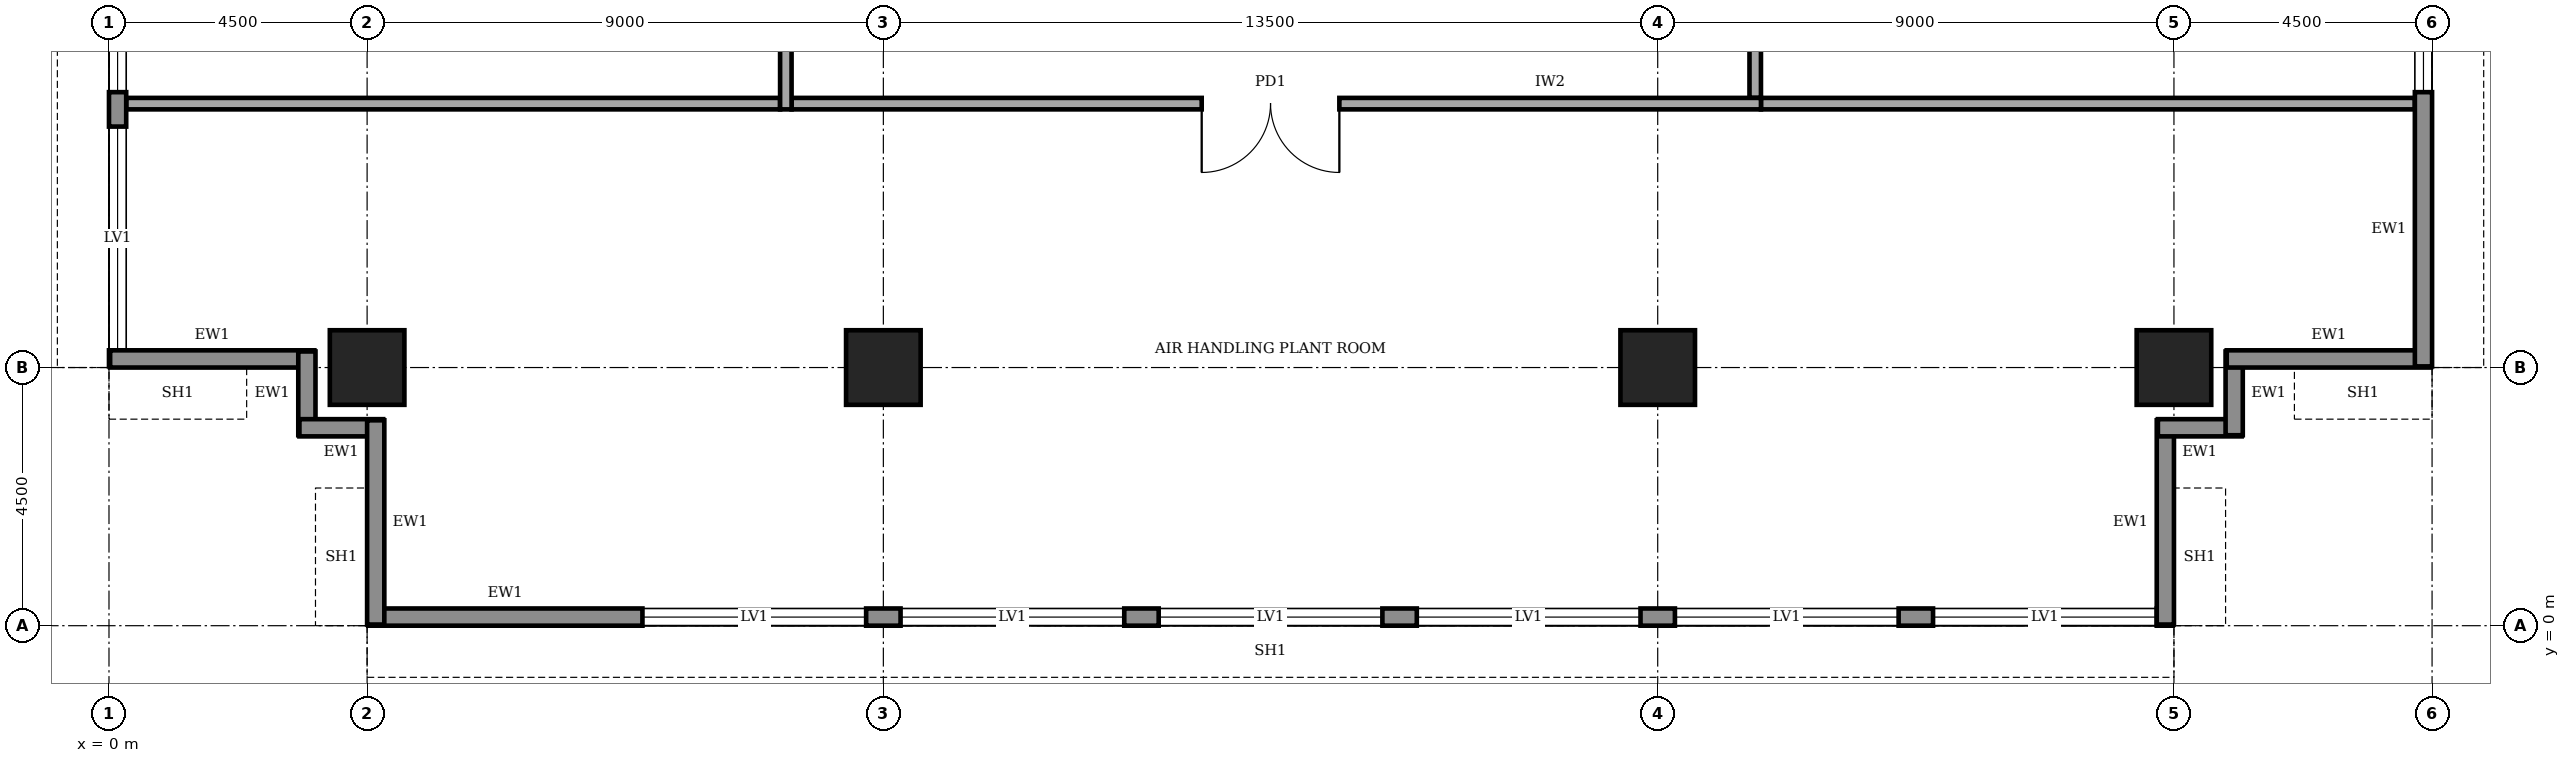
"""IFC4 building model, lengths in metres.
Left out: names, types, materials, properties, quantities, classifications, styles, units other than length and angle.
Written with IfcOpenShell. Run it as: python <this file> out.ifc"""

import sys

from ifc_helpers import new_model, si_unit, direction, frame, frame_2d, origin, origin_2d, place, context, subcontext, project, spatial, rectangle, extrude, element, fill, save


model = new_model("IFC4")
c1 = context("Model", 3, precision=1e-05, world=origin(), true_north=direction((0.0, 1.0)))
c2 = subcontext(c1, "Body", "Model", "MODEL_VIEW")
j1 = project(units=[si_unit("LENGTHUNIT", "METRE"), si_unit("PLANEANGLEUNIT", "RADIAN")], contexts=[c1])
p1 = place(None, origin())
s1 = spatial("IfcSite", under=j1, at=p1, CompositionType="ELEMENT")
p2 = place(p1, origin())
s2 = spatial("IfcBuilding", under=s1, at=p2, CompositionType="ELEMENT")
p3 = place(p2, frame((0.0, 0.0, 289.0)))
s3 = spatial("IfcBuildingStorey", under=s2, at=p3, CompositionType="ELEMENT", Elevation=289.0)
for number, where, z_axis, x_axis in (
    (1, (4.5, 4.5, 0.0), (0.0, 0.0, 1.0), (1.0, 0.0, 0.0)),
    (2, (13.5, 4.5, 0.0), (0.0, 0.0, 1.0), (1.0, 0.0, 0.0)),
    (3, (27.0, 4.5, 0.0), (0.0, 0.0, 1.0), (1.0, 0.0, 0.0)),
    (4, (36.0, 4.5, 0.0), (0.0, 0.0, 1.0), (1.0, 0.0, 0.0)),
):
    element("IfcColumn", number, at=place(p3, frame(where, z_axis=z_axis, x_axis=x_axis)), inside=s3, PredefinedType="COLUMN", context=c2, shape_type="SweptSolid", body=[
        extrude(rectangle(XDim=1.3, YDim=1.3, at=origin_2d()), origin(), (0.0, 0.0, 1.0), 4.0),
    ])
p4 = place(p3, frame((4.52, 0.15, 0.0), z_axis=(0.0, 0.0, 1.0), x_axis=(1.0, 0.0, 0.0)))
e5 = element("IfcWall", 5, at=p4, inside=s3, PredefinedType="STANDARD", context=c2, shape_type="SweptSolid", body=[
    extrude(rectangle(XDim=31.46, YDim=0.3, at=frame_2d((15.73, 0.0))), origin(), (0.0, 0.0, 1.0), 3.75),
])
p5 = place(p4, frame((4.78, 0.0, 0.9)))
e6 = element("IfcOpeningElement", 6, at=p5, cuts=e5, PredefinedType="OPENING", context=c2, shape_type="SweptSolid", body=[
    extrude(rectangle(XDim=3.9, YDim=2.2, at=frame_2d((1.95, 1.1))), frame((0.0, 0.16, 0.0), z_axis=(0.0, -1.0, 0.0), x_axis=(1.0, 0.0, 0.0)), (0.0, 0.0, 1.0), 0.32),
])
p6 = place(p4, frame((9.28, 0.0, 0.9)))
e7 = element("IfcOpeningElement", 7, at=p6, cuts=e5, PredefinedType="OPENING", context=c2, shape_type="SweptSolid", body=[
    extrude(rectangle(XDim=3.9, YDim=2.2, at=frame_2d((1.95, 1.1))), frame((0.0, 0.16, 0.0), z_axis=(0.0, -1.0, 0.0), x_axis=(1.0, 0.0, 0.0)), (0.0, 0.0, 1.0), 0.32),
])
p7 = place(p4, frame((13.78, 0.0, 0.9)))
e8 = element("IfcOpeningElement", 8, at=p7, cuts=e5, PredefinedType="OPENING", context=c2, shape_type="SweptSolid", body=[
    extrude(rectangle(XDim=3.9, YDim=2.2, at=frame_2d((1.95, 1.1))), frame((0.0, 0.16, 0.0), z_axis=(0.0, -1.0, 0.0), x_axis=(1.0, 0.0, 0.0)), (0.0, 0.0, 1.0), 0.32),
])
p8 = place(p4, frame((18.28, 0.0, 0.9)))
e9 = element("IfcOpeningElement", 9, at=p8, cuts=e5, PredefinedType="OPENING", context=c2, shape_type="SweptSolid", body=[
    extrude(rectangle(XDim=3.9, YDim=2.2, at=frame_2d((1.95, 1.1))), frame((0.0, 0.16, 0.0), z_axis=(0.0, -1.0, 0.0), x_axis=(1.0, 0.0, 0.0)), (0.0, 0.0, 1.0), 0.32),
])
p9 = place(p4, frame((22.78, 0.0, 0.9)))
e10 = element("IfcOpeningElement", 10, at=p9, cuts=e5, PredefinedType="OPENING", context=c2, shape_type="SweptSolid", body=[
    extrude(rectangle(XDim=3.9, YDim=2.2, at=frame_2d((1.95, 1.1))), frame((0.0, 0.16, 0.0), z_axis=(0.0, -1.0, 0.0), x_axis=(1.0, 0.0, 0.0)), (0.0, 0.0, 1.0), 0.32),
])
p10 = place(p4, frame((27.28, 0.0, 0.9)))
e11 = element("IfcOpeningElement", 11, at=p10, cuts=e5, PredefinedType="OPENING", context=c2, shape_type="SweptSolid", body=[
    extrude(rectangle(XDim=3.9, YDim=2.2, at=frame_2d((1.95, 1.1))), frame((0.0, 0.16, 0.0), z_axis=(0.0, -1.0, 0.0), x_axis=(1.0, 0.0, 0.0)), (0.0, 0.0, 1.0), 0.32),
])
p11 = place(p3, frame((35.85, 0.02, 0.0), z_axis=(0.0, 0.0, 1.0), x_axis=(0.0, 1.0, 0.0)))
e12 = element("IfcWall", 12, at=p11, inside=s3, PredefinedType="STANDARD", context=c2, shape_type="SweptSolid", body=[
    extrude(rectangle(XDim=3.56, YDim=0.3, at=frame_2d((1.78, 0.0))), origin(), (0.0, 0.0, 1.0), 2.85),
])
for number, where, z_axis, x_axis in (
    (13, (35.72, 3.45, 0.0), (0.0, 0.0, 1.0), (1.0, 0.0, 0.0)),
    (14, (37.05, 3.32, 0.0), (0.0, 0.0, 1.0), (0.0, 1.0, 0.0)),
):
    element("IfcWall", number, at=place(p3, frame(where, z_axis=z_axis, x_axis=x_axis)), inside=s3, PredefinedType="STANDARD", context=c2, shape_type="SweptSolid", body=[
        extrude(rectangle(XDim=1.46, YDim=0.3, at=frame_2d((0.73, 0.0))), origin(), (0.0, 0.0, 1.0), 3.75),
    ])
p12 = place(p3, frame((36.92, 4.65, 0.0), z_axis=(0.0, 0.0, 1.0), x_axis=(1.0, 0.0, 0.0)))
e15 = element("IfcWall", 15, at=p12, inside=s3, PredefinedType="STANDARD", context=c2, shape_type="SweptSolid", body=[
    extrude(rectangle(XDim=3.56, YDim=0.3, at=frame_2d((1.78, 0.0))), origin(), (0.0, 0.0, 1.0), 2.85),
])
p13 = place(p3, frame((40.35, 4.52, 0.0), z_axis=(0.0, 0.0, 1.0), x_axis=(0.0, 1.0, 0.0)))
e16 = element("IfcWall", 16, at=p13, inside=s3, PredefinedType="STANDARD", context=c2, shape_type="SweptSolid", body=[
    extrude(rectangle(XDim=31.46, YDim=0.3, at=frame_2d((15.73, 0.0))), origin(), (0.0, 0.0, 1.0), 3.75),
])
p14 = place(p13, frame((4.78, 0.0, 0.9)))
e17 = element("IfcOpeningElement", 17, at=p14, cuts=e16, PredefinedType="OPENING", context=c2, shape_type="SweptSolid", body=[
    extrude(rectangle(XDim=3.9, YDim=2.2, at=frame_2d((1.95, 1.1))), frame((0.0, 0.16, 0.0), z_axis=(0.0, -1.0, 0.0), x_axis=(1.0, 0.0, 0.0)), (0.0, 0.0, 1.0), 0.32),
])
p15 = place(p13, frame((9.28, 0.0, 0.9)))
e18 = element("IfcOpeningElement", 18, at=p15, cuts=e16, PredefinedType="OPENING", context=c2, shape_type="SweptSolid", body=[
    extrude(rectangle(XDim=3.9, YDim=2.2, at=frame_2d((1.95, 1.1))), frame((0.0, 0.16, 0.0), z_axis=(0.0, -1.0, 0.0), x_axis=(1.0, 0.0, 0.0)), (0.0, 0.0, 1.0), 0.32),
])
p16 = place(p13, frame((13.78, 0.0, 0.9)))
e19 = element("IfcOpeningElement", 19, at=p16, cuts=e16, PredefinedType="OPENING", context=c2, shape_type="SweptSolid", body=[
    extrude(rectangle(XDim=3.9, YDim=2.2, at=frame_2d((1.95, 1.1))), frame((0.0, 0.16, 0.0), z_axis=(0.0, -1.0, 0.0), x_axis=(1.0, 0.0, 0.0)), (0.0, 0.0, 1.0), 0.32),
])
p17 = place(p13, frame((18.28, 0.0, 0.9)))
e20 = element("IfcOpeningElement", 20, at=p17, cuts=e16, PredefinedType="OPENING", context=c2, shape_type="SweptSolid", body=[
    extrude(rectangle(XDim=3.9, YDim=2.2, at=frame_2d((1.95, 1.1))), frame((0.0, 0.16, 0.0), z_axis=(0.0, -1.0, 0.0), x_axis=(1.0, 0.0, 0.0)), (0.0, 0.0, 1.0), 0.32),
])
p18 = place(p13, frame((22.78, 0.0, 0.9)))
e21 = element("IfcOpeningElement", 21, at=p18, cuts=e16, PredefinedType="OPENING", context=c2, shape_type="SweptSolid", body=[
    extrude(rectangle(XDim=3.9, YDim=2.2, at=frame_2d((1.95, 1.1))), frame((0.0, 0.16, 0.0), z_axis=(0.0, -1.0, 0.0), x_axis=(1.0, 0.0, 0.0)), (0.0, 0.0, 1.0), 0.32),
])
p19 = place(p13, frame((27.28, 0.0, 0.9)))
e22 = element("IfcOpeningElement", 22, at=p19, cuts=e16, PredefinedType="OPENING", context=c2, shape_type="SweptSolid", body=[
    extrude(rectangle(XDim=3.9, YDim=2.2, at=frame_2d((1.95, 1.1))), frame((0.0, 0.16, 0.0), z_axis=(0.0, -1.0, 0.0), x_axis=(1.0, 0.0, 0.0)), (0.0, 0.0, 1.0), 0.32),
])
p20 = place(p3, frame((0.15, 35.98, 0.0), z_axis=(0.0, 0.0, 1.0), x_axis=(0.0, -1.0, 0.0)))
e23 = element("IfcWall", 23, at=p20, inside=s3, PredefinedType="STANDARD", context=c2, shape_type="SweptSolid", body=[
    extrude(rectangle(XDim=31.46, YDim=0.3, at=frame_2d((15.73, 0.0))), origin(), (0.0, 0.0, 1.0), 3.75),
])
p21 = place(p20, frame((27.28, 0.0, 0.9)))
e24 = element("IfcOpeningElement", 24, at=p21, cuts=e23, PredefinedType="OPENING", context=c2, shape_type="SweptSolid", body=[
    extrude(rectangle(XDim=3.9, YDim=2.2, at=frame_2d((1.95, 1.1))), frame((0.0, 0.16, 0.0), z_axis=(0.0, -1.0, 0.0), x_axis=(1.0, 0.0, 0.0)), (0.0, 0.0, 1.0), 0.32),
])
p22 = place(p20, frame((22.78, 0.0, 0.9)))
e25 = element("IfcOpeningElement", 25, at=p22, cuts=e23, PredefinedType="OPENING", context=c2, shape_type="SweptSolid", body=[
    extrude(rectangle(XDim=3.9, YDim=2.2, at=frame_2d((1.95, 1.1))), frame((0.0, 0.16, 0.0), z_axis=(0.0, -1.0, 0.0), x_axis=(1.0, 0.0, 0.0)), (0.0, 0.0, 1.0), 0.32),
])
p23 = place(p20, frame((18.28, 0.0, 0.9)))
e26 = element("IfcOpeningElement", 26, at=p23, cuts=e23, PredefinedType="OPENING", context=c2, shape_type="SweptSolid", body=[
    extrude(rectangle(XDim=3.9, YDim=2.2, at=frame_2d((1.95, 1.1))), frame((0.0, 0.16, 0.0), z_axis=(0.0, -1.0, 0.0), x_axis=(1.0, 0.0, 0.0)), (0.0, 0.0, 1.0), 0.32),
])
p24 = place(p20, frame((13.78, 0.0, 0.9)))
e27 = element("IfcOpeningElement", 27, at=p24, cuts=e23, PredefinedType="OPENING", context=c2, shape_type="SweptSolid", body=[
    extrude(rectangle(XDim=3.9, YDim=2.2, at=frame_2d((1.95, 1.1))), frame((0.0, 0.16, 0.0), z_axis=(0.0, -1.0, 0.0), x_axis=(1.0, 0.0, 0.0)), (0.0, 0.0, 1.0), 0.32),
])
p25 = place(p20, frame((9.28, 0.0, 0.9)))
e28 = element("IfcOpeningElement", 28, at=p25, cuts=e23, PredefinedType="OPENING", context=c2, shape_type="SweptSolid", body=[
    extrude(rectangle(XDim=3.9, YDim=2.2, at=frame_2d((1.95, 1.1))), frame((0.0, 0.16, 0.0), z_axis=(0.0, -1.0, 0.0), x_axis=(1.0, 0.0, 0.0)), (0.0, 0.0, 1.0), 0.32),
])
p26 = place(p20, frame((4.78, 0.0, 0.9)))
e29 = element("IfcOpeningElement", 29, at=p26, cuts=e23, PredefinedType="OPENING", context=c2, shape_type="SweptSolid", body=[
    extrude(rectangle(XDim=3.9, YDim=2.2, at=frame_2d((1.95, 1.1))), frame((0.0, 0.16, 0.0), z_axis=(0.0, -1.0, 0.0), x_axis=(1.0, 0.0, 0.0)), (0.0, 0.0, 1.0), 0.32),
])
p27 = place(p3, frame((0.02, 4.65, 0.0), z_axis=(0.0, 0.0, 1.0), x_axis=(1.0, 0.0, 0.0)))
e30 = element("IfcWall", 30, at=p27, inside=s3, PredefinedType="STANDARD", context=c2, shape_type="SweptSolid", body=[
    extrude(rectangle(XDim=3.56, YDim=0.3, at=frame_2d((1.78, 0.0))), origin(), (0.0, 0.0, 1.0), 2.85),
])
for number, where, z_axis, x_axis in (
    (31, (3.45, 4.78, 0.0), (0.0, 0.0, 1.0), (0.0, -1.0, 0.0)),
    (32, (3.32, 3.45, 0.0), (0.0, 0.0, 1.0), (1.0, 0.0, 0.0)),
):
    element("IfcWall", number, at=place(p3, frame(where, z_axis=z_axis, x_axis=x_axis)), inside=s3, PredefinedType="STANDARD", context=c2, shape_type="SweptSolid", body=[
        extrude(rectangle(XDim=1.46, YDim=0.3, at=frame_2d((0.73, 0.0))), origin(), (0.0, 0.0, 1.0), 3.75),
    ])
p28 = place(p3, frame((4.65, 3.58, 0.0), z_axis=(0.0, 0.0, 1.0), x_axis=(0.0, -1.0, 0.0)))
e33 = element("IfcWall", 33, at=p28, inside=s3, PredefinedType="STANDARD", context=c2, shape_type="SweptSolid", body=[
    extrude(rectangle(XDim=3.56, YDim=0.3, at=frame_2d((1.78, 0.0))), origin(), (0.0, 0.0, 1.0), 2.85),
])
p29 = place(p3, frame((11.9, 9.1, 0.0), z_axis=(0.0, 0.0, 1.0), x_axis=(1.0, 0.0, 0.0)))
e34 = element("IfcWall", 34, at=p29, inside=s3, PredefinedType="SOLIDWALL", context=c2, shape_type="SweptSolid", body=[
    extrude(rectangle(XDim=16.9, YDim=0.2, at=frame_2d((8.45, 0.0))), origin(), (0.0, 0.0, 1.0), 3.75),
])
p30 = place(p29, frame((7.15, 0.0, 0.0)))
e35 = element("IfcOpeningElement", 35, at=p30, cuts=e34, PredefinedType="OPENING", context=c2, shape_type="SweptSolid", body=[
    extrude(rectangle(XDim=2.4, YDim=2.7, at=frame_2d((1.2, 1.35))), frame((0.0, 0.11, 0.0), z_axis=(0.0, -1.0, 0.0), x_axis=(1.0, 0.0, 0.0)), (0.0, 0.0, 1.0), 0.22),
])
p31 = place(p3, frame((28.7, 9.2, 0.0), z_axis=(0.0, 0.0, 1.0), x_axis=(0.0, 1.0, 0.0)))
e36 = element("IfcWall", 36, at=p31, inside=s3, PredefinedType="SOLIDWALL", context=c2, shape_type="SweptSolid", body=[
    extrude(rectangle(XDim=22.3, YDim=0.2, at=frame_2d((11.15, 0.0))), origin(), (0.0, 0.0, 1.0), 3.75),
])
p32 = place(p31, frame((10.05, 0.0, 0.0)))
e37 = element("IfcOpeningElement", 37, at=p32, cuts=e36, PredefinedType="OPENING", context=c2, shape_type="SweptSolid", body=[
    extrude(rectangle(XDim=2.0, YDim=2.1, at=frame_2d((1.0, 1.05))), frame((0.0, 0.11, 0.0), z_axis=(0.0, -1.0, 0.0), x_axis=(1.0, 0.0, 0.0)), (0.0, 0.0, 1.0), 0.22),
])
p33 = place(p3, frame((11.8, 31.3, 0.0), z_axis=(0.0, 0.0, 1.0), x_axis=(0.0, -1.0, 0.0)))
e38 = element("IfcWall", 38, at=p33, inside=s3, PredefinedType="SOLIDWALL", context=c2, shape_type="SweptSolid", body=[
    extrude(rectangle(XDim=22.3, YDim=0.2, at=frame_2d((11.15, 0.0))), origin(), (0.0, 0.0, 1.0), 3.75),
])
p34 = place(p33, frame((19.55, 0.0, 0.0)))
e39 = element("IfcOpeningElement", 39, at=p34, cuts=e38, PredefinedType="OPENING", context=c2, shape_type="SweptSolid", body=[
    extrude(rectangle(XDim=1.0, YDim=2.1, at=frame_2d((0.5, 1.05))), frame((0.0, 0.11, 0.0), z_axis=(0.0, -1.0, 0.0), x_axis=(1.0, 0.0, 0.0)), (0.0, 0.0, 1.0), 0.22),
])
p35 = place(p33, frame((15.45, 0.0, 0.0)))
e40 = element("IfcOpeningElement", 40, at=p35, cuts=e38, PredefinedType="OPENING", context=c2, shape_type="SweptSolid", body=[
    extrude(rectangle(XDim=0.9, YDim=2.1, at=frame_2d((0.45, 1.05))), frame((0.0, 0.11, 0.0), z_axis=(0.0, -1.0, 0.0), x_axis=(1.0, 0.0, 0.0)), (0.0, 0.0, 1.0), 0.22),
])
p36 = place(p33, frame((12.45, 0.0, 0.0)))
e41 = element("IfcOpeningElement", 41, at=p36, cuts=e38, PredefinedType="OPENING", context=c2, shape_type="SweptSolid", body=[
    extrude(rectangle(XDim=0.9, YDim=2.1, at=frame_2d((0.45, 1.05))), frame((0.0, 0.11, 0.0), z_axis=(0.0, -1.0, 0.0), x_axis=(1.0, 0.0, 0.0)), (0.0, 0.0, 1.0), 0.22),
])
p37 = place(p33, frame((7.6, 0.0, 0.0)))
e42 = element("IfcOpeningElement", 42, at=p37, cuts=e38, PredefinedType="OPENING", context=c2, shape_type="SweptSolid", body=[
    extrude(rectangle(XDim=0.9, YDim=2.1, at=frame_2d((0.45, 1.05))), frame((0.0, 0.11, 0.0), z_axis=(0.0, -1.0, 0.0), x_axis=(1.0, 0.0, 0.0)), (0.0, 0.0, 1.0), 0.22),
])
p38 = place(p33, frame((4.8, 0.0, 0.0)))
e43 = element("IfcOpeningElement", 43, at=p38, cuts=e38, PredefinedType="OPENING", context=c2, shape_type="SweptSolid", body=[
    extrude(rectangle(XDim=1.0, YDim=2.1, at=frame_2d((0.5, 1.05))), frame((0.0, 0.11, 0.0), z_axis=(0.0, -1.0, 0.0), x_axis=(1.0, 0.0, 0.0)), (0.0, 0.0, 1.0), 0.22),
])
p39 = place(p33, frame((10.3, 0.0, 0.0)))
e44 = element("IfcOpeningElement", 44, at=p39, cuts=e38, PredefinedType="OPENING", context=c2, shape_type="SweptSolid", body=[
    extrude(rectangle(XDim=1.0, YDim=2.1, at=frame_2d((0.5, 1.05))), frame((0.0, 0.11, 0.0), z_axis=(0.0, -1.0, 0.0), x_axis=(1.0, 0.0, 0.0)), (0.0, 0.0, 1.0), 0.22),
])
p40 = place(p33, frame((1.55, 0.0, 0.0)))
e45 = element("IfcOpeningElement", 45, at=p40, cuts=e38, PredefinedType="OPENING", context=c2, shape_type="SweptSolid", body=[
    extrude(rectangle(XDim=1.0, YDim=2.1, at=frame_2d((0.5, 1.05))), frame((0.0, 0.11, 0.0), z_axis=(0.0, -1.0, 0.0), x_axis=(1.0, 0.0, 0.0)), (0.0, 0.0, 1.0), 0.22),
])
for number, where, z_axis, x_axis in (
    (46, (0.3, 9.1, 0.0), (0.0, 0.0, 1.0), (1.0, 0.0, 0.0)),
    (47, (28.8, 9.1, 0.0), (0.0, 0.0, 1.0), (1.0, 0.0, 0.0)),
):
    element("IfcWall", number, at=place(p3, frame(where, z_axis=z_axis, x_axis=x_axis)), inside=s3, PredefinedType="SOLIDWALL", context=c2, shape_type="SweptSolid", body=[
        extrude(rectangle(XDim=11.4, YDim=0.2, at=frame_2d((5.7, 0.0))), origin(), (0.0, 0.0, 1.0), 3.75),
    ])
p41 = place(p5, origin())
e48 = element("IfcWindow", 48, at=p41, inside=s3, PartitioningType="SINGLE_PANEL", PredefinedType="WINDOW", context=c2, shape_type="SweptSolid", body=[
    extrude(rectangle(XDim=3.9, YDim=2.2, at=frame_2d((1.95, 1.1))), frame((0.0, 0.03, 0.0), z_axis=(0.0, -1.0, 0.0), x_axis=(1.0, 0.0, 0.0)), (0.0, 0.0, 1.0), 0.06),
])
fill(e6, e48)
p42 = place(p6, origin())
e49 = element("IfcWindow", 49, at=p42, inside=s3, PartitioningType="SINGLE_PANEL", PredefinedType="WINDOW", context=c2, shape_type="SweptSolid", body=[
    extrude(rectangle(XDim=3.9, YDim=2.2, at=frame_2d((1.95, 1.1))), frame((0.0, 0.03, 0.0), z_axis=(0.0, -1.0, 0.0), x_axis=(1.0, 0.0, 0.0)), (0.0, 0.0, 1.0), 0.06),
])
fill(e7, e49)
p43 = place(p7, origin())
e50 = element("IfcWindow", 50, at=p43, inside=s3, PartitioningType="SINGLE_PANEL", PredefinedType="WINDOW", context=c2, shape_type="SweptSolid", body=[
    extrude(rectangle(XDim=3.9, YDim=2.2, at=frame_2d((1.95, 1.1))), frame((0.0, 0.03, 0.0), z_axis=(0.0, -1.0, 0.0), x_axis=(1.0, 0.0, 0.0)), (0.0, 0.0, 1.0), 0.06),
])
fill(e8, e50)
p44 = place(p8, origin())
e51 = element("IfcWindow", 51, at=p44, inside=s3, PartitioningType="SINGLE_PANEL", PredefinedType="WINDOW", context=c2, shape_type="SweptSolid", body=[
    extrude(rectangle(XDim=3.9, YDim=2.2, at=frame_2d((1.95, 1.1))), frame((0.0, 0.03, 0.0), z_axis=(0.0, -1.0, 0.0), x_axis=(1.0, 0.0, 0.0)), (0.0, 0.0, 1.0), 0.06),
])
fill(e9, e51)
p45 = place(p9, origin())
e52 = element("IfcWindow", 52, at=p45, inside=s3, PartitioningType="SINGLE_PANEL", PredefinedType="WINDOW", context=c2, shape_type="SweptSolid", body=[
    extrude(rectangle(XDim=3.9, YDim=2.2, at=frame_2d((1.95, 1.1))), frame((0.0, 0.03, 0.0), z_axis=(0.0, -1.0, 0.0), x_axis=(1.0, 0.0, 0.0)), (0.0, 0.0, 1.0), 0.06),
])
fill(e10, e52)
p46 = place(p10, origin())
e53 = element("IfcWindow", 53, at=p46, inside=s3, PartitioningType="SINGLE_PANEL", PredefinedType="WINDOW", context=c2, shape_type="SweptSolid", body=[
    extrude(rectangle(XDim=3.9, YDim=2.2, at=frame_2d((1.95, 1.1))), frame((0.0, 0.03, 0.0), z_axis=(0.0, -1.0, 0.0), x_axis=(1.0, 0.0, 0.0)), (0.0, 0.0, 1.0), 0.06),
])
fill(e11, e53)
p47 = place(p14, origin())
e54 = element("IfcWindow", 54, at=p47, inside=s3, PartitioningType="SINGLE_PANEL", PredefinedType="WINDOW", context=c2, shape_type="SweptSolid", body=[
    extrude(rectangle(XDim=3.9, YDim=2.2, at=frame_2d((1.95, 1.1))), frame((0.0, 0.03, 0.0), z_axis=(0.0, -1.0, 0.0), x_axis=(1.0, 0.0, 0.0)), (0.0, 0.0, 1.0), 0.06),
])
fill(e17, e54)
p48 = place(p21, origin())
e55 = element("IfcWindow", 55, at=p48, inside=s3, PartitioningType="SINGLE_PANEL", PredefinedType="WINDOW", context=c2, shape_type="SweptSolid", body=[
    extrude(rectangle(XDim=3.9, YDim=2.2, at=frame_2d((1.95, 1.1))), frame((0.0, 0.03, 0.0), z_axis=(0.0, -1.0, 0.0), x_axis=(1.0, 0.0, 0.0)), (0.0, 0.0, 1.0), 0.06),
])
fill(e24, e55)
p49 = place(p22, origin())
e56 = element("IfcWindow", 56, at=p49, inside=s3, PartitioningType="SINGLE_PANEL", PredefinedType="WINDOW", context=c2, shape_type="SweptSolid", body=[
    extrude(rectangle(XDim=3.9, YDim=2.2, at=frame_2d((1.95, 1.1))), frame((0.0, 0.03, 0.0), z_axis=(0.0, -1.0, 0.0), x_axis=(1.0, 0.0, 0.0)), (0.0, 0.0, 1.0), 0.06),
])
fill(e25, e56)
p50 = place(p30, frame((2.4, 0.0, 0.0), z_axis=(0.0, 0.0, 1.0), x_axis=(-1.0, 0.0, 0.0)))
e57 = element("IfcDoor", 57, at=p50, inside=s3, OperationType="DOUBLE_DOOR_SINGLE_SWING", PredefinedType="DOOR", context=c2, shape_type="SweptSolid", body=[
    extrude(rectangle(XDim=2.4, YDim=2.7, at=frame_2d((1.2, 1.35))), frame((0.0, 0.025, 0.0), z_axis=(0.0, -1.0, 0.0), x_axis=(1.0, 0.0, 0.0)), (0.0, 0.0, 1.0), 0.05),
])
fill(e35, e57)
save(model, sys.argv[1])
